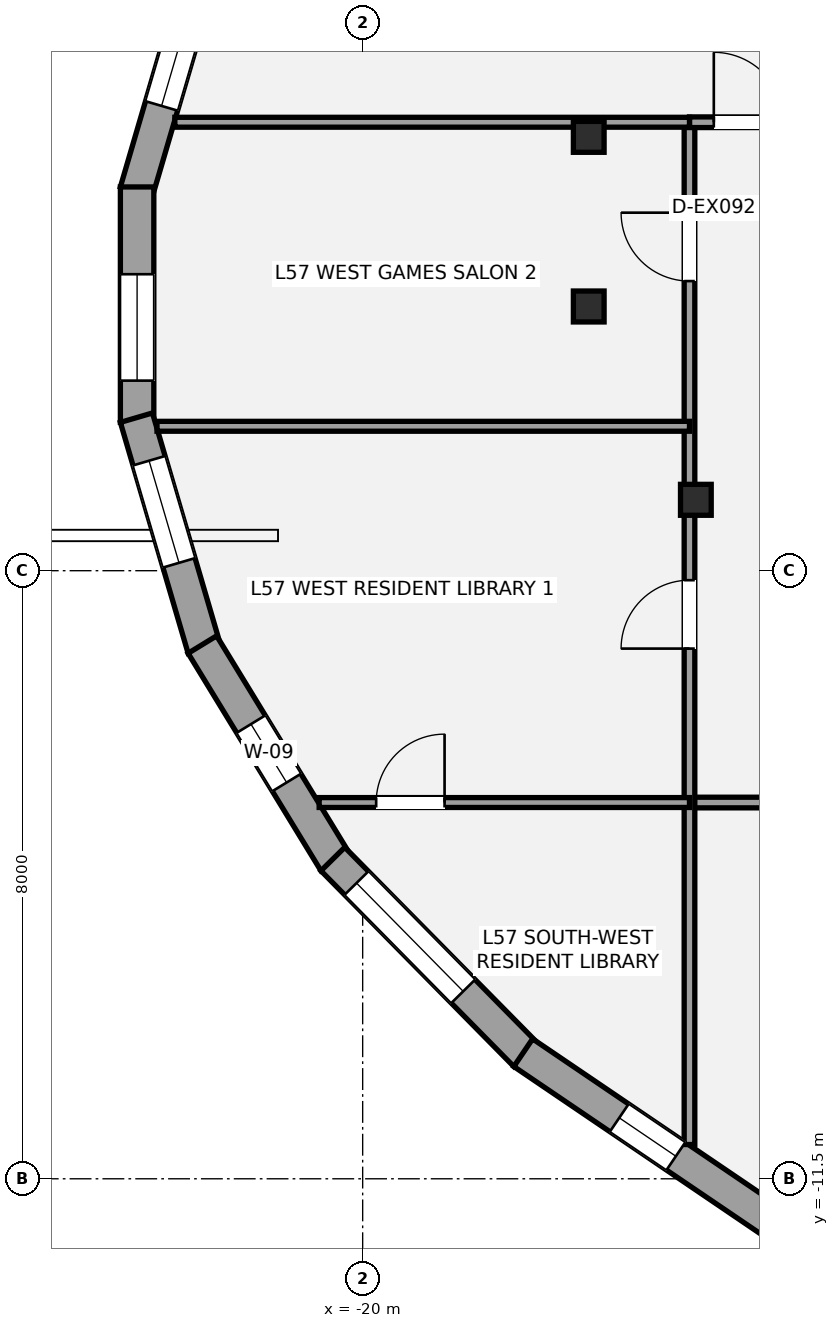
"""IFC4 building model, lengths in metres.
Left out: names, types, materials, properties, quantities, classifications, styles, units other than length and angle.
Written with IfcOpenShell. Run it as: python <this file> out.ifc"""

import sys

from ifc_helpers import new_model, si_unit, direction, frame, frame_2d, origin, origin_2d, place, context, subcontext, project, spatial, rectangle, i_section, extrude, element, fill, save


model = new_model("IFC4")
c1 = context("Model", 3, precision=1e-05, world=origin(), true_north=direction((0.0, 1.0)))
c2 = subcontext(c1, "Body", "Model", "MODEL_VIEW")
j1 = project(units=[si_unit("LENGTHUNIT", "METRE"), si_unit("PLANEANGLEUNIT", "RADIAN")], contexts=[c1])
p1 = place(None, origin())
s1 = spatial("IfcSite", under=j1, at=p1, CompositionType="ELEMENT")
p2 = place(p1, origin())
s2 = spatial("IfcBuilding", under=s1, at=p2, CompositionType="ELEMENT")
p3 = place(p2, frame((0.0, 0.0, 205.9)))
s3 = spatial("IfcBuildingStorey", under=s2, at=p3, CompositionType="ELEMENT", Elevation=205.9)
for number, where, z_axis, x_axis in (
    (1, (-17.026, 2.208, 0.0), (0.0, 0.0, 1.0), (1.0, 0.0, 0.0)),
    (2, (-17.026, -0.024, 0.0), (0.0, 0.0, 1.0), (1.0, 0.0, 0.0)),
    (3, (-15.616, -2.567, 0.0), (0.0, 0.0, 1.0), (1.0, 0.0, 0.0)),
):
    element("IfcColumn", number, at=place(p3, frame(where, z_axis=z_axis, x_axis=x_axis)), inside=s3, PredefinedType="COLUMN", context=c2, shape_type="SweptSolid", body=[
        extrude(i_section(OverallWidth=0.404, OverallDepth=0.407, WebThickness=0.027, FlangeThickness=0.044, at=origin_2d()), origin(), (0.0, 0.0, 1.0), 4.1),
    ])
p4 = place(p3, frame((-22.977, 1.487, 0.0), z_axis=(0.0, 0.0, 1.0), x_axis=(0.281477355005, 0.959567870773, 0.0)))
e4 = element("IfcWall", 4, at=p4, inside=s3, PredefinedType="STANDARD", context=c2, shape_type="SweptSolid", body=[
    extrude(rectangle(XDim=3.166, YDim=0.44, at=frame_2d((1.583, 0.0))), origin(), (0.0, 0.0, 1.0), 3.215),
])
p5 = place(p4, frame((1.176, 0.0, 0.58)))
e5 = element("IfcOpeningElement", 5, at=p5, cuts=e4, PredefinedType="OPENING", context=c2, shape_type="SweptSolid", body=[
    extrude(rectangle(XDim=1.4, YDim=1.55, at=frame_2d((0.7, 0.775))), frame((0.0, 0.23, 0.0), z_axis=(0.0, -1.0, 0.0), x_axis=(1.0, 0.0, 0.0)), (0.0, 0.0, 1.0), 0.46),
])
p6 = place(p3, frame((-22.968, -1.549, 0.0), z_axis=(0.0, 0.0, 1.0), x_axis=(0.0, 1.0, 0.0)))
e6 = element("IfcWall", 6, at=p6, inside=s3, PredefinedType="STANDARD", context=c2, shape_type="SweptSolid", body=[
    extrude(rectangle(XDim=3.097, YDim=0.44, at=frame_2d((1.549, 0.0))), origin(), (0.0, 0.0, 1.0), 3.219),
])
p7 = place(p6, frame((0.549, 0.0, 0.58)))
e7 = element("IfcOpeningElement", 7, at=p7, cuts=e6, PredefinedType="OPENING", context=c2, shape_type="SweptSolid", body=[
    extrude(rectangle(XDim=1.4, YDim=1.55, at=frame_2d((0.7, 0.775))), frame((0.0, 0.23, 0.0), z_axis=(0.0, -1.0, 0.0), x_axis=(1.0, 0.0, 0.0)), (0.0, 0.0, 1.0), 0.46),
])
p8 = place(p3, frame((-22.086, -4.525, 0.0), z_axis=(0.0, 0.0, 1.0), x_axis=(-0.281477355005, 0.959567870773, 0.0)))
e8 = element("IfcWall", 8, at=p8, inside=s3, PredefinedType="STANDARD", context=c2, shape_type="SweptSolid", body=[
    extrude(rectangle(XDim=3.166, YDim=0.44, at=frame_2d((1.583, 0.0))), origin(), (0.0, 0.0, 1.0), 3.215),
])
p9 = place(p8, frame((1.176, 0.0, 0.58)))
e9 = element("IfcOpeningElement", 9, at=p9, cuts=e8, PredefinedType="OPENING", context=c2, shape_type="SweptSolid", body=[
    extrude(rectangle(XDim=1.4, YDim=1.55, at=frame_2d((0.7, 0.775))), frame((0.0, 0.23, 0.0), z_axis=(0.0, -1.0, 0.0), x_axis=(1.0, 0.0, 0.0)), (0.0, 0.0, 1.0), 0.46),
])
p10 = place(p3, frame((-20.361, -7.333, 0.0), z_axis=(0.0, 0.0, 1.0), x_axis=(-0.521214394333, 0.853425775999, 0.0)))
e10 = element("IfcWall", 10, at=p10, inside=s3, PredefinedType="STANDARD", context=c2, shape_type="SweptSolid", body=[
    extrude(rectangle(XDim=3.353, YDim=0.44, at=frame_2d((1.677, 0.0))), origin(), (0.0, 0.0, 1.0), 3.215),
])
p11 = place(p10, frame((1.227, 0.0, 0.58)))
e11 = element("IfcOpeningElement", 11, at=p11, cuts=e10, PredefinedType="OPENING", context=c2, shape_type="SweptSolid", body=[
    extrude(rectangle(XDim=0.9, YDim=1.35, at=frame_2d((0.45, 0.675))), frame((0.0, 0.23, 0.0), z_axis=(0.0, -1.0, 0.0), x_axis=(1.0, 0.0, 0.0)), (0.0, 0.0, 1.0), 0.46),
])
p12 = place(p3, frame((-17.854, -9.869, 0.0), z_axis=(0.0, 0.0, 1.0), x_axis=(-0.701887992659, 0.712287333708, 0.0)))
e12 = element("IfcWall", 12, at=p12, inside=s3, PredefinedType="STANDARD", context=c2, shape_type="SweptSolid", body=[
    extrude(rectangle(XDim=3.615, YDim=0.44, at=frame_2d((1.808, 0.0))), origin(), (0.0, 0.0, 1.0), 3.215),
])
p13 = place(p12, frame((1.172, 0.0, 0.6)))
e13 = element("IfcOpeningElement", 13, at=p13, cuts=e12, PredefinedType="OPENING", context=c2, shape_type="SweptSolid", body=[
    extrude(rectangle(XDim=2.0, YDim=2.1, at=frame_2d((1.0, 1.05))), frame((0.0, 0.23, 0.0), z_axis=(0.0, -1.0, 0.0), x_axis=(1.0, 0.0, 0.0)), (0.0, 0.0, 1.0), 0.46),
])
p14 = place(p3, frame((-14.575, -12.088, 0.0), z_axis=(0.0, 0.0, 1.0), x_axis=(-0.827641742214, 0.561256756347, 0.0)))
e14 = element("IfcWall", 14, at=p14, inside=s3, PredefinedType="STANDARD", context=c2, shape_type="SweptSolid", body=[
    extrude(rectangle(XDim=4.002, YDim=0.44, at=frame_2d((2.001, 0.0))), origin(), (0.0, 0.0, 1.0), 3.219),
])
p15 = place(p14, frame((1.576, 0.0, 0.58)))
e15 = element("IfcOpeningElement", 15, at=p15, cuts=e14, PredefinedType="OPENING", context=c2, shape_type="SweptSolid", body=[
    extrude(rectangle(XDim=0.9, YDim=1.35, at=frame_2d((0.45, 0.675))), frame((0.0, 0.23, 0.0), z_axis=(0.0, -1.0, 0.0), x_axis=(1.0, 0.0, 0.0)), (0.0, 0.0, 1.0), 0.46),
])
p16 = place(p3, frame((-15.7, -6.55, 0.0), z_axis=(0.0, 0.0, 1.0), x_axis=(1.0, 0.0, 0.0)))
e16 = element("IfcWall", 16, at=p16, inside=s3, PredefinedType="PARTITIONING", context=c2, shape_type="SweptSolid", body=[
    extrude(rectangle(XDim=31.9, YDim=0.14, at=frame_2d((15.95, 0.0))), origin(), (0.0, 0.0, 1.0), 3.373),
])
p17 = place(p16, frame((5.5, 0.0, 0.0)))
e17 = element("IfcOpeningElement", 17, at=p17, cuts=e16, PredefinedType="OPENING", context=c2, shape_type="SweptSolid", body=[
    extrude(rectangle(XDim=0.9, YDim=2.1, at=frame_2d((0.45, 1.05))), frame((0.0, 0.08, 0.0), z_axis=(0.0, -1.0, 0.0), x_axis=(1.0, 0.0, 0.0)), (0.0, 0.0, 1.0), 0.16),
])
p18 = place(p16, frame((16.05, 0.0, 0.0)))
e18 = element("IfcOpeningElement", 18, at=p18, cuts=e16, PredefinedType="OPENING", context=c2, shape_type="SweptSolid", body=[
    extrude(rectangle(XDim=0.9, YDim=2.1, at=frame_2d((0.45, 1.05))), frame((0.0, 0.08, 0.0), z_axis=(0.0, -1.0, 0.0), x_axis=(1.0, 0.0, 0.0)), (0.0, 0.0, 1.0), 0.16),
])
p19 = place(p16, frame((22.446, 0.0, 0.0)))
e19 = element("IfcOpeningElement", 19, at=p19, cuts=e16, PredefinedType="OPENING", context=c2, shape_type="SweptSolid", body=[
    extrude(rectangle(XDim=0.9, YDim=2.1, at=frame_2d((0.45, 1.05))), frame((0.0, 0.08, 0.0), z_axis=(0.0, -1.0, 0.0), x_axis=(1.0, 0.0, 0.0)), (0.0, 0.0, 1.0), 0.16),
])
p20 = place(p16, frame((25.492, 0.0, 0.0)))
e20 = element("IfcOpeningElement", 20, at=p20, cuts=e16, PredefinedType="OPENING", context=c2, shape_type="SweptSolid", body=[
    extrude(rectangle(XDim=0.9, YDim=2.1, at=frame_2d((0.45, 1.05))), frame((0.0, 0.08, 0.0), z_axis=(0.0, -1.0, 0.0), x_axis=(1.0, 0.0, 0.0)), (0.0, 0.0, 1.0), 0.16),
])
p21 = place(p16, frame((29.096, 0.0, 0.0)))
e21 = element("IfcOpeningElement", 21, at=p21, cuts=e16, PredefinedType="OPENING", context=c2, shape_type="SweptSolid", body=[
    extrude(rectangle(XDim=0.9, YDim=2.1, at=frame_2d((0.45, 1.05))), frame((0.0, 0.08, 0.0), z_axis=(0.0, -1.0, 0.0), x_axis=(1.0, 0.0, 0.0)), (0.0, 0.0, 1.0), 0.16),
])
p22 = place(p3, frame((-15.7, -11.049, 0.0), z_axis=(0.0, 0.0, 1.0), x_axis=(0.0, 1.0, 0.0)))
e22 = element("IfcWall", 22, at=p22, inside=s3, PredefinedType="PARTITIONING", context=c2, shape_type="SweptSolid", body=[
    extrude(rectangle(XDim=13.449, YDim=0.14, at=frame_2d((6.725, 0.0))), origin(), (0.0, 0.0, 1.0), 3.307),
])
p23 = place(p22, frame((6.524, 0.0, 0.0)))
e23 = element("IfcOpeningElement", 23, at=p23, cuts=e22, PredefinedType="OPENING", context=c2, shape_type="SweptSolid", body=[
    extrude(rectangle(XDim=0.9, YDim=2.1, at=frame_2d((0.45, 1.05))), frame((0.0, 0.08, 0.0), z_axis=(0.0, -1.0, 0.0), x_axis=(1.0, 0.0, 0.0)), (0.0, 0.0, 1.0), 0.16),
])
p24 = place(p22, frame((11.36, 0.0, 0.0)))
e24 = element("IfcOpeningElement", 24, at=p24, cuts=e22, PredefinedType="OPENING", context=c2, shape_type="SweptSolid", body=[
    extrude(rectangle(XDim=0.9, YDim=2.1, at=frame_2d((0.45, 1.05))), frame((0.0, 0.08, 0.0), z_axis=(0.0, -1.0, 0.0), x_axis=(1.0, 0.0, 0.0)), (0.0, 0.0, 1.0), 0.16),
])
p25 = place(p3, frame((-15.7, 2.4, 0.0), z_axis=(0.0, 0.0, 1.0), x_axis=(1.0, 0.0, 0.0)))
e25 = element("IfcWall", 25, at=p25, inside=s3, PredefinedType="PARTITIONING", context=c2, shape_type="SweptSolid", body=[
    extrude(rectangle(XDim=1.9, YDim=0.14, at=frame_2d((0.95, 0.0))), origin(), (0.0, 0.0, 1.0), 3.373),
])
p26 = place(p25, frame((0.32, 0.0, 0.0)))
e26 = element("IfcOpeningElement", 26, at=p26, cuts=e25, PredefinedType="OPENING", context=c2, shape_type="SweptSolid", body=[
    extrude(rectangle(XDim=0.92, YDim=2.15, at=frame_2d((0.46, 1.075))), frame((0.0, 0.08, 0.0), z_axis=(0.0, -1.0, 0.0), x_axis=(1.0, 0.0, 0.0)), (0.0, 0.0, 1.0), 0.16),
])
p27 = place(p3, frame((-22.471, 2.4, 0.0), z_axis=(0.0, 0.0, 1.0), x_axis=(1.0, 0.0, 0.0)))
e27 = element("IfcWall", 27, at=p27, inside=s3, PredefinedType="PARTITIONING", context=c2, shape_type="SweptSolid", body=[
    extrude(rectangle(XDim=6.771, YDim=0.13, at=frame_2d((3.386, 0.0))), origin(), (0.0, 0.0, 1.0), 3.373),
])
p28 = place(p3, frame((-20.573, -6.55, 0.0), z_axis=(0.0, 0.0, 1.0), x_axis=(1.0, 0.0, 0.0)))
e28 = element("IfcWall", 28, at=p28, inside=s3, PredefinedType="PARTITIONING", context=c2, shape_type="SweptSolid", body=[
    extrude(rectangle(XDim=4.873, YDim=0.13, at=frame_2d((2.436, 0.0))), origin(), (0.0, 0.0, 1.0), 3.217),
])
p29 = place(p28, frame((0.75, 0.0, 0.0)))
e29 = element("IfcOpeningElement", 29, at=p29, cuts=e28, PredefinedType="OPENING", context=c2, shape_type="SweptSolid", body=[
    extrude(rectangle(XDim=0.9, YDim=2.1, at=frame_2d((0.45, 1.05))), frame((0.0, 0.075, 0.0), z_axis=(0.0, -1.0, 0.0), x_axis=(1.0, 0.0, 0.0)), (0.0, 0.0, 1.0), 0.15),
])
p30 = place(p3, frame((-22.706, -1.6, 0.0), z_axis=(0.0, 0.0, 1.0), x_axis=(1.0, 0.0, 0.0)))
e30 = element("IfcWall", 30, at=p30, inside=s3, PredefinedType="PARTITIONING", context=c2, shape_type="SweptSolid", body=[
    extrude(rectangle(XDim=7.006, YDim=0.13, at=frame_2d((3.503, 0.0))), origin(), (0.0, 0.0, 1.0), 3.373),
])
p31 = place(p5, origin())
e31 = element("IfcWindow", 31, at=p31, inside=s3, PartitioningType="SINGLE_PANEL", PredefinedType="WINDOW", context=c2, shape_type="SweptSolid", body=[
    extrude(rectangle(XDim=1.4, YDim=1.55, at=frame_2d((0.7, 0.775))), frame((0.0, -0.01, 0.0), z_axis=(0.0, -1.0, 0.0), x_axis=(1.0, 0.0, 0.0)), (0.0, 0.0, 1.0), 0.06),
])
fill(e5, e31)
p32 = place(p7, origin())
e32 = element("IfcWindow", 32, at=p32, inside=s3, PartitioningType="SINGLE_PANEL", PredefinedType="WINDOW", context=c2, shape_type="SweptSolid", body=[
    extrude(rectangle(XDim=1.4, YDim=1.55, at=frame_2d((0.7, 0.775))), frame((0.0, -0.01, 0.0), z_axis=(0.0, -1.0, 0.0), x_axis=(1.0, 0.0, 0.0)), (0.0, 0.0, 1.0), 0.06),
])
fill(e7, e32)
p33 = place(p9, origin())
e33 = element("IfcWindow", 33, at=p33, inside=s3, PartitioningType="SINGLE_PANEL", PredefinedType="WINDOW", context=c2, shape_type="SweptSolid", body=[
    extrude(rectangle(XDim=1.4, YDim=1.55, at=frame_2d((0.7, 0.775))), frame((0.0, -0.01, 0.0), z_axis=(0.0, -1.0, 0.0), x_axis=(1.0, 0.0, 0.0)), (0.0, 0.0, 1.0), 0.06),
])
fill(e9, e33)
p34 = place(p11, origin())
e34 = element("IfcWindow", 34, at=p34, inside=s3, PartitioningType="SINGLE_PANEL", PredefinedType="WINDOW", context=c2, shape_type="SweptSolid", body=[
    extrude(rectangle(XDim=0.9, YDim=1.35, at=frame_2d((0.45, 0.675))), frame((0.0, -0.01, 0.0), z_axis=(0.0, -1.0, 0.0), x_axis=(1.0, 0.0, 0.0)), (0.0, 0.0, 1.0), 0.06),
])
fill(e11, e34)
p35 = place(p13, origin())
e35 = element("IfcWindow", 35, at=p35, inside=s3, PartitioningType="SINGLE_PANEL", PredefinedType="WINDOW", context=c2, shape_type="SweptSolid", body=[
    extrude(rectangle(XDim=2.0, YDim=2.1, at=frame_2d((1.0, 1.05))), frame((0.0, -0.01, 0.0), z_axis=(0.0, -1.0, 0.0), x_axis=(1.0, 0.0, 0.0)), (0.0, 0.0, 1.0), 0.06),
])
fill(e13, e35)
p36 = place(p15, origin())
e36 = element("IfcWindow", 36, at=p36, inside=s3, PartitioningType="SINGLE_PANEL", PredefinedType="WINDOW", context=c2, shape_type="SweptSolid", body=[
    extrude(rectangle(XDim=0.9, YDim=1.35, at=frame_2d((0.45, 0.675))), frame((0.0, -0.01, 0.0), z_axis=(0.0, -1.0, 0.0), x_axis=(1.0, 0.0, 0.0)), (0.0, 0.0, 1.0), 0.06),
])
fill(e15, e36)
p37 = place(p26, origin())
e37 = element("IfcDoor", 37, at=p37, inside=s3, OperationType="SINGLE_SWING_LEFT", PredefinedType="DOOR", context=c2, shape_type="SweptSolid", body=[
    extrude(rectangle(XDim=0.92, YDim=2.15, at=frame_2d((0.46, 1.075))), frame((0.0, 0.025, 0.0), z_axis=(0.0, -1.0, 0.0), x_axis=(1.0, 0.0, 0.0)), (0.0, 0.0, 1.0), 0.05),
])
fill(e26, e37)
p38 = place(p29, origin())
e38 = element("IfcDoor", 38, at=p38, inside=s3, OperationType="SINGLE_SWING_RIGHT", PredefinedType="DOOR", context=c2, shape_type="SweptSolid", body=[
    extrude(rectangle(XDim=0.9, YDim=2.1, at=frame_2d((0.45, 1.05))), frame((0.0, 0.025, 0.0), z_axis=(0.0, -1.0, 0.0), x_axis=(1.0, 0.0, 0.0)), (0.0, 0.0, 1.0), 0.05),
])
fill(e29, e38)
p39 = place(p23, origin())
e39 = element("IfcDoor", 39, at=p39, inside=s3, OperationType="SINGLE_SWING_LEFT", PredefinedType="DOOR", context=c2, shape_type="SweptSolid", body=[
    extrude(rectangle(XDim=0.9, YDim=2.1, at=frame_2d((0.45, 1.05))), frame((0.0, 0.025, 0.0), z_axis=(0.0, -1.0, 0.0), x_axis=(1.0, 0.0, 0.0)), (0.0, 0.0, 1.0), 0.05),
])
fill(e23, e39)
p40 = place(p24, origin())
e40 = element("IfcDoor", 40, at=p40, inside=s3, OperationType="SINGLE_SWING_RIGHT", PredefinedType="DOOR", context=c2, shape_type="SweptSolid", body=[
    extrude(rectangle(XDim=0.9, YDim=2.1, at=frame_2d((0.45, 1.05))), frame((0.0, 0.025, 0.0), z_axis=(0.0, -1.0, 0.0), x_axis=(1.0, 0.0, 0.0)), (0.0, 0.0, 1.0), 0.05),
])
fill(e24, e40)
save(model, sys.argv[1])
